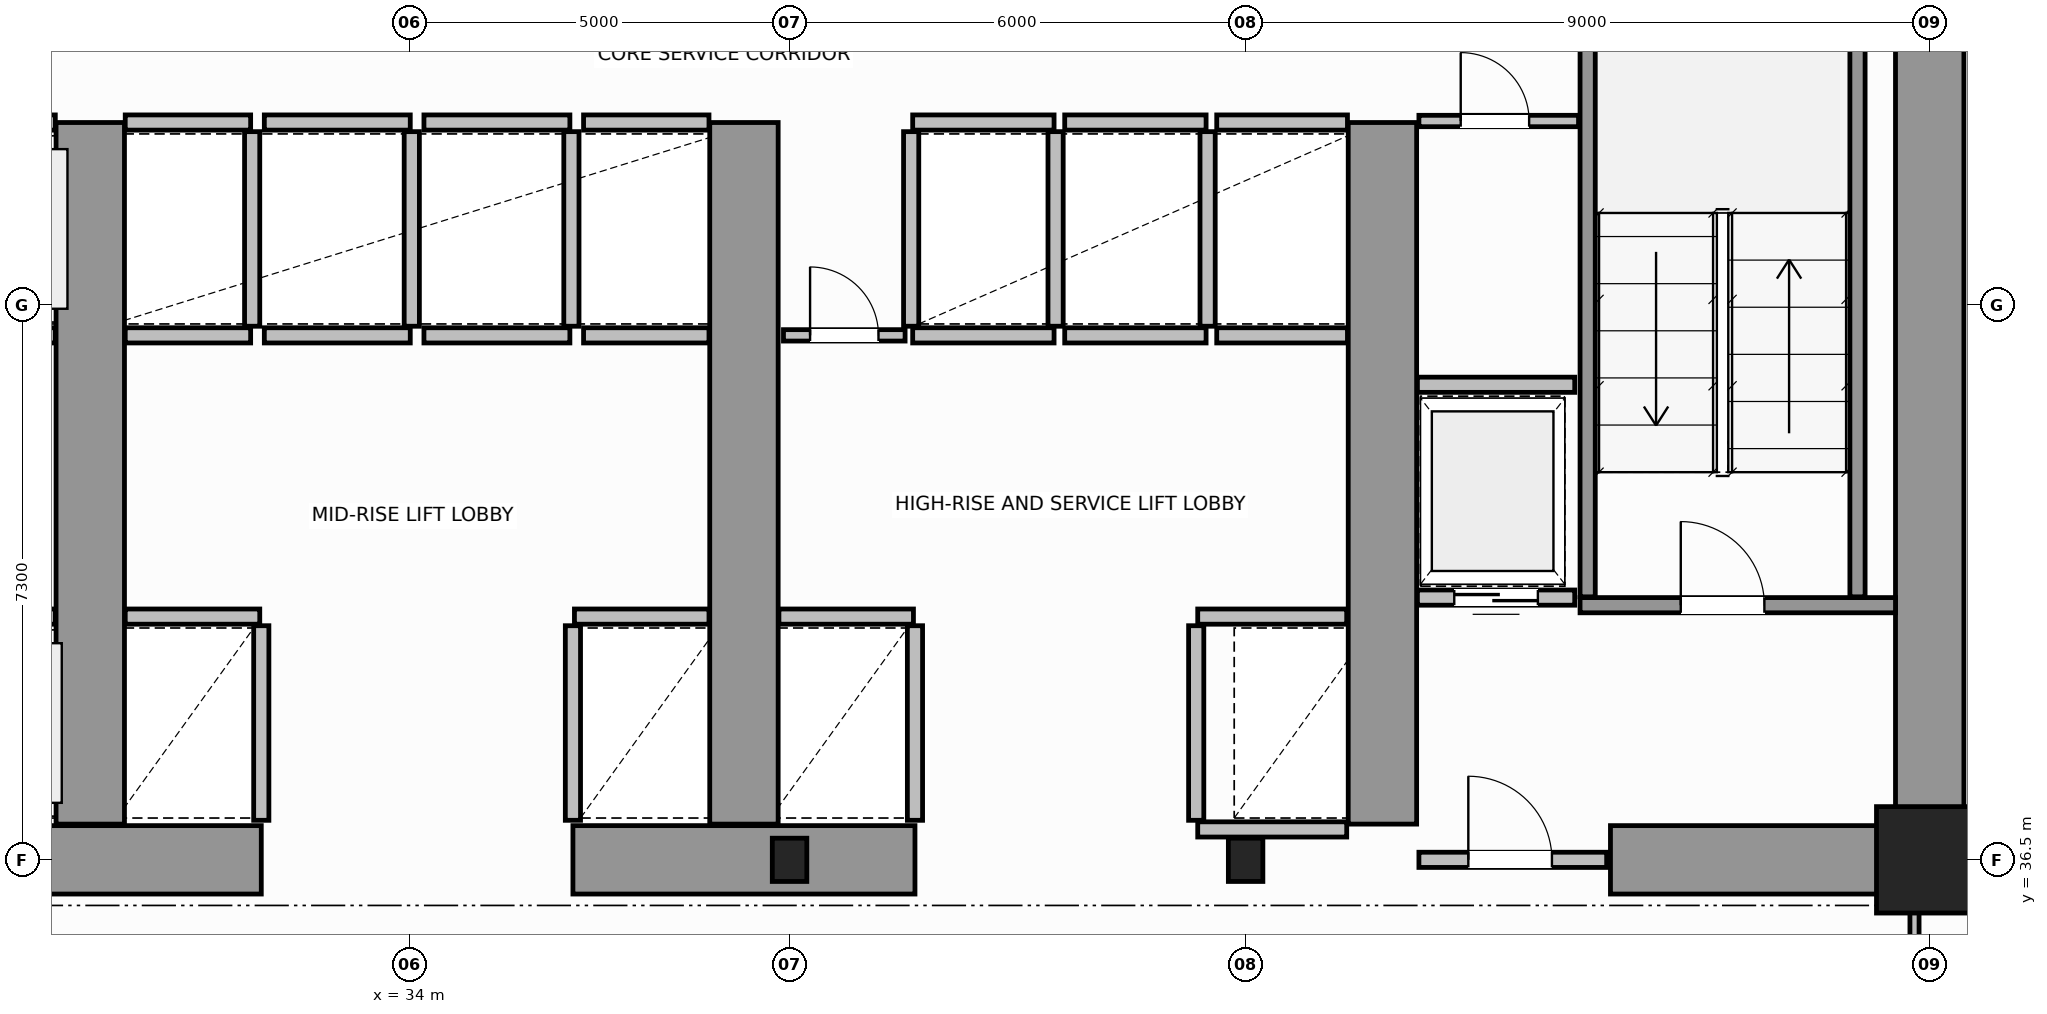
"""IFC4 building model, lengths in metres.
Left out: names, types, materials, properties, quantities, classifications, styles, units other than length and angle.
Written with IfcOpenShell. Run it as: python <this file> out.ifc"""

import sys

from ifc_helpers import new_model, si_unit, direction, frame, frame_2d, origin, origin_2d, place, context, subcontext, project, spatial, rectangle, i_section, extrude, source, transform, mapped, element, fill, save


model = new_model("IFC4")
c1 = context("Model", 3, precision=1e-05, world=origin(), true_north=direction((0.0, 1.0)))
c2 = subcontext(c1, "Body", "Model", "MODEL_VIEW")
j1 = project(units=[si_unit("LENGTHUNIT", "METRE"), si_unit("PLANEANGLEUNIT", "RADIAN")], contexts=[c1])
p1 = place(None, origin())
s1 = spatial("IfcSite", under=j1, at=p1, CompositionType="ELEMENT")
p2 = place(p1, origin())
s2 = spatial("IfcBuilding", under=s1, at=p2, CompositionType="ELEMENT")
p3 = place(p2, frame((0.0, 0.0, 64.4)))
s3 = spatial("IfcBuildingStorey", under=s2, at=p3, CompositionType="ELEMENT", Elevation=64.4)
m1 = source(origin(), c2, "Body", "SweptSolid", [
    extrude(i_section(OverallWidth=0.454, OverallDepth=0.569, WebThickness=0.078, FlangeThickness=0.08, FilletRadius=0.015, at=origin_2d()), origin(), (0.0, 0.0, 1.0), 3.8),
])
for number, where, z_axis, x_axis in (
    (1, (39.0, 36.5, 0.0), (0.0, 0.0, 1.0), (1.0, 0.0, 0.0)),
    (2, (45.0, 36.5, 0.0), (0.0, 0.0, 1.0), (1.0, 0.0, 0.0)),
):
    element("IfcColumn", number, at=place(p3, frame(where, z_axis=z_axis, x_axis=x_axis)), inside=s3, PredefinedType="COLUMN", context=c2, shape_type="MappedRepresentation", body=[
        mapped(m1, transform((0.0, 0.0, 0.0), scale=1.0)),
    ])
m2 = source(origin(), c2, "Body", "SweptSolid", [
    extrude(rectangle(XDim=1.4, YDim=1.4, at=origin_2d()), origin(), (0.0, 0.0, 1.0), 3.8),
])
p4 = place(p3, frame((54.0, 36.5, 0.0), z_axis=(0.0, 0.0, 1.0), x_axis=(1.0, 0.0, 0.0)))
e3 = element("IfcColumn", 3, at=p4, inside=s3, PredefinedType="COLUMN", context=c2, shape_type="MappedRepresentation", body=[
    mapped(m2, transform((0.0, 0.0, 0.0), scale=1.0)),
])
p5 = place(p3, frame((54.0, 36.5, 0.0), z_axis=(0.0, 0.0, 1.0), x_axis=(0.0, 1.0, 0.0)))
e4 = element("IfcWall", 4, at=p5, inside=s3, PredefinedType="SHEAR", context=c2, shape_type="SweptSolid", body=[
    extrude(rectangle(XDim=14.5, YDim=0.9, at=frame_2d((7.25, 0.0))), origin(), (0.0, 0.0, 1.0), 3.8),
])
for number, where, z_axis, x_axis in (
    (5, (27.55, 36.5, 0.0), (0.0, 0.0, 1.0), (1.0, 0.0, 0.0)),
    (6, (36.15, 36.5, 0.0), (0.0, 0.0, 1.0), (1.0, 0.0, 0.0)),
):
    element("IfcWall", number, at=place(p3, frame(where, z_axis=z_axis, x_axis=x_axis)), inside=s3, PredefinedType="SHEAR", context=c2, shape_type="SweptSolid", body=[
        extrude(rectangle(XDim=4.5, YDim=0.9, at=frame_2d((2.25, 0.0))), origin(), (0.0, 0.0, 1.0), 3.8),
    ])
p6 = place(p3, frame((49.8, 36.5, 0.0), z_axis=(0.0, 0.0, 1.0), x_axis=(1.0, 0.0, 0.0)))
e7 = element("IfcWall", 7, at=p6, inside=s3, PredefinedType="SHEAR", context=c2, shape_type="SweptSolid", body=[
    extrude(rectangle(XDim=3.73, YDim=0.9, at=frame_2d((1.865, 0.0))), origin(), (0.0, 0.0, 1.0), 2.38),
])
for number, where, z_axis, x_axis in (
    (8, (29.8, 36.97, 0.0), (0.0, 0.0, 1.0), (0.0, 1.0, 0.0)),
    (9, (38.4, 36.97, 0.0), (0.0, 0.0, 1.0), (0.0, 1.0, 0.0)),
    (10, (46.8, 36.97, 0.0), (0.0, 0.0, 1.0), (0.0, 1.0, 0.0)),
):
    element("IfcWall", number, at=place(p3, frame(where, z_axis=z_axis, x_axis=x_axis)), inside=s3, PredefinedType="SHEAR", context=c2, shape_type="SweptSolid", body=[
        extrude(rectangle(XDim=9.23, YDim=0.9, at=frame_2d((4.615, 0.0))), origin(), (0.0, 0.0, 1.0), 3.8),
    ])
p7 = place(p3, frame((49.4, 39.85, 0.0), z_axis=(0.0, 0.0, 1.0), x_axis=(1.0, 0.0, 0.0)))
e11 = element("IfcWall", 11, at=p7, inside=s3, PredefinedType="SOLIDWALL", context=c2, shape_type="SweptSolid", body=[
    extrude(rectangle(XDim=4.15, YDim=0.2, at=frame_2d((2.075, 0.0))), origin(), (0.0, 0.0, 1.0), 3.8),
])
p8 = place(p7, frame((1.325, 0.0, 0.0)))
e12 = element("IfcOpeningElement", 12, at=p8, cuts=e11, PredefinedType="OPENING", context=c2, shape_type="SweptSolid", body=[
    extrude(rectangle(XDim=1.1, YDim=2.15, at=frame_2d((0.55, 1.075))), frame((0.0, 0.11, 0.0), z_axis=(0.0, -1.0, 0.0), x_axis=(1.0, 0.0, 0.0)), (0.0, 0.0, 1.0), 0.22),
])
for number, where, z_axis, x_axis in (
    (13, (49.5, 39.96, 0.0), (0.0, 0.0, 1.0), (0.0, 1.0, 0.0)),
    (14, (53.05, 39.96, 0.0), (0.0, 0.0, 1.0), (0.0, 1.0, 0.0)),
):
    element("IfcWall", number, at=place(p3, frame(where, z_axis=z_axis, x_axis=x_axis)), inside=s3, PredefinedType="SOLIDWALL", context=c2, shape_type="SweptSolid", body=[
        extrude(rectangle(XDim=9.93, YDim=0.2, at=frame_2d((4.965, 0.0))), origin(), (0.0, 0.0, 1.0), 3.8),
    ])
p9 = place(p3, frame((47.28, 36.5, 0.0), z_axis=(0.0, 0.0, 1.0), x_axis=(1.0, 0.0, 0.0)))
e15 = element("IfcWall", 15, at=p9, inside=s3, PredefinedType="SOLIDWALL", context=c2, shape_type="SweptSolid", body=[
    extrude(rectangle(XDim=2.47, YDim=0.2, at=frame_2d((1.235, 0.0))), origin(), (0.0, 0.0, 1.0), 2.37),
])
p10 = place(p9, frame((0.65, 0.0, 0.0)))
e16 = element("IfcOpeningElement", 16, at=p10, cuts=e15, PredefinedType="OPENING", context=c2, shape_type="SweptSolid", body=[
    extrude(rectangle(XDim=1.1, YDim=2.15, at=frame_2d((0.55, 1.075))), frame((0.0, 0.11, 0.0), z_axis=(0.0, -1.0, 0.0), x_axis=(1.0, 0.0, 0.0)), (0.0, 0.0, 1.0), 0.22),
])
p11 = place(p3, frame((27.57, 39.7, 0.0), z_axis=(0.0, 0.0, 1.0), x_axis=(1.0, 0.0, 0.0)))
e17 = element("IfcWall", 17, at=p11, inside=s3, PredefinedType="SOLIDWALL", context=c2, shape_type="SweptSolid", body=[
    extrude(rectangle(XDim=1.77, YDim=0.2, at=frame_2d((0.885, 0.0))), origin(), (0.0, 0.0, 1.0), 3.58),
])
p12 = place(p11, frame((0.335, 0.0, 0.0)))
e18 = element("IfcOpeningElement", 18, at=p12, cuts=e17, PredefinedType="OPENING", context=c2, shape_type="SweptSolid", body=[
    extrude(rectangle(XDim=1.1, YDim=2.15, at=frame_2d((0.55, 1.075))), frame((0.0, 0.11, 0.0), z_axis=(0.0, -1.0, 0.0), x_axis=(1.0, 0.0, 0.0)), (0.0, 0.0, 1.0), 0.22),
])
p13 = place(p3, frame((27.69, 43.4, 0.0), z_axis=(0.0, 0.0, 1.0), x_axis=(1.0, 0.0, 0.0)))
e19 = element("IfcWall", 19, at=p13, inside=s3, PredefinedType="SOLIDWALL", context=c2, shape_type="SweptSolid", body=[
    extrude(rectangle(XDim=1.65, YDim=0.2, at=frame_2d((0.825, 0.0))), origin(), (0.0, 0.0, 1.0), 3.58),
])
p14 = place(p13, frame((0.275, 0.0, 0.0)))
e20 = element("IfcOpeningElement", 20, at=p14, cuts=e19, PredefinedType="OPENING", context=c2, shape_type="SweptSolid", body=[
    extrude(rectangle(XDim=1.1, YDim=2.15, at=frame_2d((0.55, 1.075))), frame((0.0, 0.11, 0.0), z_axis=(0.0, -1.0, 0.0), x_axis=(1.0, 0.0, 0.0)), (0.0, 0.0, 1.0), 0.22),
])
p15 = place(p3, frame((27.69, 46.2, 0.0), z_axis=(0.0, 0.0, 1.0), x_axis=(1.0, 0.0, 0.0)))
e21 = element("IfcWall", 21, at=p15, inside=s3, PredefinedType="SOLIDWALL", context=c2, shape_type="SweptSolid", body=[
    extrude(rectangle(XDim=1.65, YDim=0.2, at=frame_2d((0.825, 0.0))), origin(), (0.0, 0.0, 1.0), 3.58),
])
p16 = place(p3, frame((30.26, 39.7, 0.0), z_axis=(0.0, 0.0, 1.0), x_axis=(1.0, 0.0, 0.0)))
e22 = element("IfcWall", 22, at=p16, inside=s3, PredefinedType="SOLIDWALL", context=c2, shape_type="SweptSolid", body=[
    extrude(rectangle(XDim=1.77, YDim=0.2, at=frame_2d((0.885, 0.0))), origin(), (0.0, 0.0, 1.0), 3.58),
])
p17 = place(p3, frame((32.05, 37.02, 0.0), z_axis=(0.0, 0.0, 1.0), x_axis=(0.0, 1.0, 0.0)))
e23 = element("IfcWall", 23, at=p17, inside=s3, PredefinedType="SOLIDWALL", context=c2, shape_type="SweptSolid", body=[
    extrude(rectangle(XDim=2.56, YDim=0.2, at=frame_2d((1.28, 0.0))), origin(), (0.0, 0.0, 1.0), 3.58),
])
p18 = place(p3, frame((36.17, 39.7, 0.0), z_axis=(0.0, 0.0, 1.0), x_axis=(1.0, 0.0, 0.0)))
e24 = element("IfcWall", 24, at=p18, inside=s3, PredefinedType="SOLIDWALL", context=c2, shape_type="SweptSolid", body=[
    extrude(rectangle(XDim=1.77, YDim=0.2, at=frame_2d((0.885, 0.0))), origin(), (0.0, 0.0, 1.0), 3.58),
])
p19 = place(p3, frame((36.15, 37.02, 0.0), z_axis=(0.0, 0.0, 1.0), x_axis=(0.0, 1.0, 0.0)))
e25 = element("IfcWall", 25, at=p19, inside=s3, PredefinedType="SOLIDWALL", context=c2, shape_type="SweptSolid", body=[
    extrude(rectangle(XDim=2.56, YDim=0.2, at=frame_2d((1.28, 0.0))), origin(), (0.0, 0.0, 1.0), 3.58),
])
for number, where, z_axis, x_axis in (
    (26, (30.26, 43.4, 0.0), (0.0, 0.0, 1.0), (1.0, 0.0, 0.0)),
    (27, (30.26, 46.2, 0.0), (0.0, 0.0, 1.0), (1.0, 0.0, 0.0)),
):
    element("IfcWall", number, at=place(p3, frame(where, z_axis=z_axis, x_axis=x_axis)), inside=s3, PredefinedType="SOLIDWALL", context=c2, shape_type="SweptSolid", body=[
        extrude(rectangle(XDim=1.65, YDim=0.2, at=frame_2d((0.825, 0.0))), origin(), (0.0, 0.0, 1.0), 3.58),
    ])
p20 = place(p3, frame((31.93, 43.52, 0.0), z_axis=(0.0, 0.0, 1.0), x_axis=(0.0, 1.0, 0.0)))
e28 = element("IfcWall", 28, at=p20, inside=s3, PredefinedType="SOLIDWALL", context=c2, shape_type="SweptSolid", body=[
    extrude(rectangle(XDim=2.56, YDim=0.2, at=frame_2d((1.28, 0.0))), origin(), (0.0, 0.0, 1.0), 3.58),
])
for number, where, z_axis, x_axis in (
    (29, (32.09, 43.4, 0.0), (0.0, 0.0, 1.0), (1.0, 0.0, 0.0)),
    (30, (32.09, 46.2, 0.0), (0.0, 0.0, 1.0), (1.0, 0.0, 0.0)),
):
    element("IfcWall", number, at=place(p3, frame(where, z_axis=z_axis, x_axis=x_axis)), inside=s3, PredefinedType="SOLIDWALL", context=c2, shape_type="SweptSolid", body=[
        extrude(rectangle(XDim=1.92, YDim=0.2, at=frame_2d((0.96, 0.0))), origin(), (0.0, 0.0, 1.0), 3.58),
    ])
p21 = place(p3, frame((34.03, 43.52, 0.0), z_axis=(0.0, 0.0, 1.0), x_axis=(0.0, 1.0, 0.0)))
e31 = element("IfcWall", 31, at=p21, inside=s3, PredefinedType="SOLIDWALL", context=c2, shape_type="SweptSolid", body=[
    extrude(rectangle(XDim=2.56, YDim=0.2, at=frame_2d((1.28, 0.0))), origin(), (0.0, 0.0, 1.0), 3.58),
])
for number, where, z_axis, x_axis in (
    (32, (34.19, 43.4, 0.0), (0.0, 0.0, 1.0), (1.0, 0.0, 0.0)),
    (33, (34.19, 46.2, 0.0), (0.0, 0.0, 1.0), (1.0, 0.0, 0.0)),
):
    element("IfcWall", number, at=place(p3, frame(where, z_axis=z_axis, x_axis=x_axis)), inside=s3, PredefinedType="SOLIDWALL", context=c2, shape_type="SweptSolid", body=[
        extrude(rectangle(XDim=1.92, YDim=0.2, at=frame_2d((0.96, 0.0))), origin(), (0.0, 0.0, 1.0), 3.58),
    ])
p22 = place(p3, frame((36.13, 43.52, 0.0), z_axis=(0.0, 0.0, 1.0), x_axis=(0.0, 1.0, 0.0)))
e34 = element("IfcWall", 34, at=p22, inside=s3, PredefinedType="SOLIDWALL", context=c2, shape_type="SweptSolid", body=[
    extrude(rectangle(XDim=2.56, YDim=0.2, at=frame_2d((1.28, 0.0))), origin(), (0.0, 0.0, 1.0), 3.58),
])
for number, where, z_axis, x_axis in (
    (35, (36.29, 43.4, 0.0), (0.0, 0.0, 1.0), (1.0, 0.0, 0.0)),
    (36, (36.29, 46.2, 0.0), (0.0, 0.0, 1.0), (1.0, 0.0, 0.0)),
):
    element("IfcWall", number, at=place(p3, frame(where, z_axis=z_axis, x_axis=x_axis)), inside=s3, PredefinedType="SOLIDWALL", context=c2, shape_type="SweptSolid", body=[
        extrude(rectangle(XDim=1.65, YDim=0.2, at=frame_2d((0.825, 0.0))), origin(), (0.0, 0.0, 1.0), 3.58),
    ])
p23 = place(p3, frame((38.86, 39.7, 0.0), z_axis=(0.0, 0.0, 1.0), x_axis=(1.0, 0.0, 0.0)))
e37 = element("IfcWall", 37, at=p23, inside=s3, PredefinedType="SOLIDWALL", context=c2, shape_type="SweptSolid", body=[
    extrude(rectangle(XDim=1.77, YDim=0.2, at=frame_2d((0.885, 0.0))), origin(), (0.0, 0.0, 1.0), 3.58),
])
p24 = place(p3, frame((40.65, 37.02, 0.0), z_axis=(0.0, 0.0, 1.0), x_axis=(0.0, 1.0, 0.0)))
e38 = element("IfcWall", 38, at=p24, inside=s3, PredefinedType="SOLIDWALL", context=c2, shape_type="SweptSolid", body=[
    extrude(rectangle(XDim=2.56, YDim=0.2, at=frame_2d((1.28, 0.0))), origin(), (0.0, 0.0, 1.0), 3.58),
])
p25 = place(p3, frame((44.37, 39.7, 0.0), z_axis=(0.0, 0.0, 1.0), x_axis=(1.0, 0.0, 0.0)))
e39 = element("IfcWall", 39, at=p25, inside=s3, PredefinedType="SOLIDWALL", context=c2, shape_type="SweptSolid", body=[
    extrude(rectangle(XDim=1.96, YDim=0.2, at=frame_2d((0.98, 0.0))), origin(), (0.0, 0.0, 1.0), 3.58),
])
p26 = place(p3, frame((44.37, 36.9, 0.0), z_axis=(0.0, 0.0, 1.0), x_axis=(1.0, 0.0, 0.0)))
e40 = element("IfcWall", 40, at=p26, inside=s3, PredefinedType="SOLIDWALL", context=c2, shape_type="SweptSolid", body=[
    extrude(rectangle(XDim=1.96, YDim=0.2, at=frame_2d((0.98, 0.0))), origin(), (0.0, 0.0, 1.0), 2.37),
])
p27 = place(p3, frame((44.35, 37.02, 0.0), z_axis=(0.0, 0.0, 1.0), x_axis=(0.0, 1.0, 0.0)))
e41 = element("IfcWall", 41, at=p27, inside=s3, PredefinedType="SOLIDWALL", context=c2, shape_type="SweptSolid", body=[
    extrude(rectangle(XDim=2.56, YDim=0.2, at=frame_2d((1.28, 0.0))), origin(), (0.0, 0.0, 1.0), 3.58),
])
for number, where, z_axis, x_axis in (
    (42, (40.62, 43.4, 0.0), (0.0, 0.0, 1.0), (1.0, 0.0, 0.0)),
    (43, (40.62, 46.2, 0.0), (0.0, 0.0, 1.0), (1.0, 0.0, 0.0)),
):
    element("IfcWall", number, at=place(p3, frame(where, z_axis=z_axis, x_axis=x_axis)), inside=s3, PredefinedType="SOLIDWALL", context=c2, shape_type="SweptSolid", body=[
        extrude(rectangle(XDim=1.86, YDim=0.2, at=frame_2d((0.93, 0.0))), origin(), (0.0, 0.0, 1.0), 3.58),
    ])
for number, where, z_axis, x_axis in (
    (44, (40.6, 43.52, 0.0), (0.0, 0.0, 1.0), (0.0, 1.0, 0.0)),
    (45, (42.5, 43.52, 0.0), (0.0, 0.0, 1.0), (0.0, 1.0, 0.0)),
):
    element("IfcWall", number, at=place(p3, frame(where, z_axis=z_axis, x_axis=x_axis)), inside=s3, PredefinedType="SOLIDWALL", context=c2, shape_type="SweptSolid", body=[
        extrude(rectangle(XDim=2.56, YDim=0.2, at=frame_2d((1.28, 0.0))), origin(), (0.0, 0.0, 1.0), 3.58),
    ])
for number, where, z_axis, x_axis in (
    (46, (42.62, 43.4, 0.0), (0.0, 0.0, 1.0), (1.0, 0.0, 0.0)),
    (47, (42.62, 46.2, 0.0), (0.0, 0.0, 1.0), (1.0, 0.0, 0.0)),
):
    element("IfcWall", number, at=place(p3, frame(where, z_axis=z_axis, x_axis=x_axis)), inside=s3, PredefinedType="SOLIDWALL", context=c2, shape_type="SweptSolid", body=[
        extrude(rectangle(XDim=1.86, YDim=0.2, at=frame_2d((0.93, 0.0))), origin(), (0.0, 0.0, 1.0), 3.58),
    ])
p28 = place(p3, frame((44.5, 43.52, 0.0), z_axis=(0.0, 0.0, 1.0), x_axis=(0.0, 1.0, 0.0)))
e48 = element("IfcWall", 48, at=p28, inside=s3, PredefinedType="SOLIDWALL", context=c2, shape_type="SweptSolid", body=[
    extrude(rectangle(XDim=2.56, YDim=0.2, at=frame_2d((1.28, 0.0))), origin(), (0.0, 0.0, 1.0), 3.58),
])
for number, where, z_axis, x_axis in (
    (49, (44.62, 43.4, 0.0), (0.0, 0.0, 1.0), (1.0, 0.0, 0.0)),
    (50, (44.62, 46.2, 0.0), (0.0, 0.0, 1.0), (1.0, 0.0, 0.0)),
):
    element("IfcWall", number, at=place(p3, frame(where, z_axis=z_axis, x_axis=x_axis)), inside=s3, PredefinedType="SOLIDWALL", context=c2, shape_type="SweptSolid", body=[
        extrude(rectangle(XDim=1.72, YDim=0.2, at=frame_2d((0.86, 0.0))), origin(), (0.0, 0.0, 1.0), 3.58),
    ])
p29 = place(p3, frame((47.26, 39.95, 0.0), z_axis=(0.0, 0.0, 1.0), x_axis=(1.0, 0.0, 0.0)))
e51 = element("IfcWall", 51, at=p29, inside=s3, PredefinedType="SOLIDWALL", context=c2, shape_type="SweptSolid", body=[
    extrude(rectangle(XDim=2.07, YDim=0.2, at=frame_2d((1.035, 0.0))), origin(), (0.0, 0.0, 1.0), 3.58),
])
p30 = place(p29, frame((0.485, 0.0, 0.0)))
e52 = element("IfcOpeningElement", 52, at=p30, cuts=e51, PredefinedType="OPENING", context=c2, shape_type="SweptSolid", body=[
    extrude(rectangle(XDim=1.1, YDim=2.15, at=frame_2d((0.55, 1.075))), frame((0.0, 0.11, 0.0), z_axis=(0.0, -1.0, 0.0), x_axis=(1.0, 0.0, 0.0)), (0.0, 0.0, 1.0), 0.22),
])
p31 = place(p3, frame((47.26, 42.75, 0.0), z_axis=(0.0, 0.0, 1.0), x_axis=(1.0, 0.0, 0.0)))
e53 = element("IfcWall", 53, at=p31, inside=s3, PredefinedType="SOLIDWALL", context=c2, shape_type="SweptSolid", body=[
    extrude(rectangle(XDim=2.07, YDim=0.2, at=frame_2d((1.035, 0.0))), origin(), (0.0, 0.0, 1.0), 3.58),
])
p32 = place(p3, frame((47.28, 46.22, 0.0), z_axis=(0.0, 0.0, 1.0), x_axis=(1.0, 0.0, 0.0)))
e54 = element("IfcWall", 54, at=p32, inside=s3, PredefinedType="PARTITIONING", context=c2, shape_type="SweptSolid", body=[
    extrude(rectangle(XDim=2.1, YDim=0.15, at=frame_2d((1.05, 0.0))), origin(), (0.0, 0.0, 1.0), 3.58),
])
p33 = place(p32, frame((0.55, 0.0, 0.0)))
e55 = element("IfcOpeningElement", 55, at=p33, cuts=e54, PredefinedType="OPENING", context=c2, shape_type="SweptSolid", body=[
    extrude(rectangle(XDim=0.9, YDim=2.1, at=frame_2d((0.45, 1.05))), frame((0.0, 0.085, 0.0), z_axis=(0.0, -1.0, 0.0), x_axis=(1.0, 0.0, 0.0)), (0.0, 0.0, 1.0), 0.17),
])
p34 = place(p3, frame((38.92, 43.4, 0.0), z_axis=(0.0, 0.0, 1.0), x_axis=(1.0, 0.0, 0.0)))
e56 = element("IfcWall", 56, at=p34, inside=s3, PredefinedType="PARTITIONING", context=c2, shape_type="SweptSolid", body=[
    extrude(rectangle(XDim=1.6, YDim=0.15, at=frame_2d((0.8, 0.0))), origin(), (0.0, 0.0, 1.0), 3.58),
])
p35 = place(p34, frame((0.35, 0.0, 0.0)))
e57 = element("IfcOpeningElement", 57, at=p35, cuts=e56, PredefinedType="OPENING", context=c2, shape_type="SweptSolid", body=[
    extrude(rectangle(XDim=0.9, YDim=2.1, at=frame_2d((0.45, 1.05))), frame((0.0, 0.085, 0.0), z_axis=(0.0, -1.0, 0.0), x_axis=(1.0, 0.0, 0.0)), (0.0, 0.0, 1.0), 0.17),
])
p36 = place(p3, frame((53.8, 34.16, 0.0), z_axis=(0.0, 0.0, 1.0), x_axis=(0.0, 1.0, 0.0)))
e58 = element("IfcWall", 58, at=p36, inside=s3, PredefinedType="PARTITIONING", context=c2, shape_type="SweptSolid", body=[
    extrude(rectangle(XDim=2.28, YDim=0.12, at=frame_2d((1.14, 0.0))), origin(), (0.0, 0.0, 1.0), 3.58),
])
p37 = place(p36, frame((0.3, 0.0, 0.0)))
e59 = element("IfcOpeningElement", 59, at=p37, cuts=e58, PredefinedType="OPENING", context=c2, shape_type="SweptSolid", body=[
    extrude(rectangle(XDim=0.9, YDim=2.15, at=frame_2d((0.45, 1.075))), frame((0.0, 0.07, 0.0), z_axis=(0.0, -1.0, 0.0), x_axis=(1.0, 0.0, 0.0)), (0.0, 0.0, 1.0), 0.14),
])
m3 = source(origin(), c2, "Body", "SweptSolid", [
    extrude(rectangle(XDim=1.1, YDim=2.15, at=frame_2d((0.55, 1.075))), frame((0.0, 0.025, 0.0), z_axis=(0.0, -1.0, 0.0), x_axis=(1.0, 0.0, 0.0)), (0.0, 0.0, 1.0), 0.05),
])
p38 = place(p8, origin())
e60 = element("IfcDoor", 60, at=p38, inside=s3, OperationType="SINGLE_SWING_RIGHT", PredefinedType="DOOR", context=c2, shape_type="MappedRepresentation", body=[
    mapped(m3, transform((0.0, 0.0, 0.0), scale=1.0)),
])
fill(e12, e60)
p39 = place(p10, origin())
e61 = element("IfcDoor", 61, at=p39, inside=s3, OperationType="SINGLE_SWING_LEFT", PredefinedType="DOOR", context=c2, shape_type="MappedRepresentation", body=[
    mapped(m3, transform((0.0, 0.0, 0.0), scale=1.0)),
])
fill(e16, e61)
p40 = place(p30, origin())
e62 = element("IfcDoor", 62, at=p40, inside=s3, OperationType="DOUBLE_DOOR_SLIDING", PredefinedType="DOOR", context=c2, shape_type="MappedRepresentation", body=[
    mapped(m3, transform((0.0, 0.0, 0.0), scale=1.0)),
])
fill(e52, e62)
m4 = source(origin(), c2, "Body", "SweptSolid", [
    extrude(rectangle(XDim=0.9, YDim=2.1, at=frame_2d((0.45, 1.05))), frame((0.0, 0.025, 0.0), z_axis=(0.0, -1.0, 0.0), x_axis=(1.0, 0.0, 0.0)), (0.0, 0.0, 1.0), 0.05),
])
p41 = place(p33, origin())
e63 = element("IfcDoor", 63, at=p41, inside=s3, OperationType="SINGLE_SWING_RIGHT", PredefinedType="DOOR", context=c2, shape_type="MappedRepresentation", body=[
    mapped(m4, transform((0.0, 0.0, 0.0), scale=1.0)),
])
fill(e55, e63)
p42 = place(p35, origin())
e64 = element("IfcDoor", 64, at=p42, inside=s3, OperationType="SINGLE_SWING_LEFT", PredefinedType="DOOR", context=c2, shape_type="MappedRepresentation", body=[
    mapped(m4, transform((0.0, 0.0, 0.0), scale=1.0)),
])
fill(e57, e64)
save(model, sys.argv[1])
